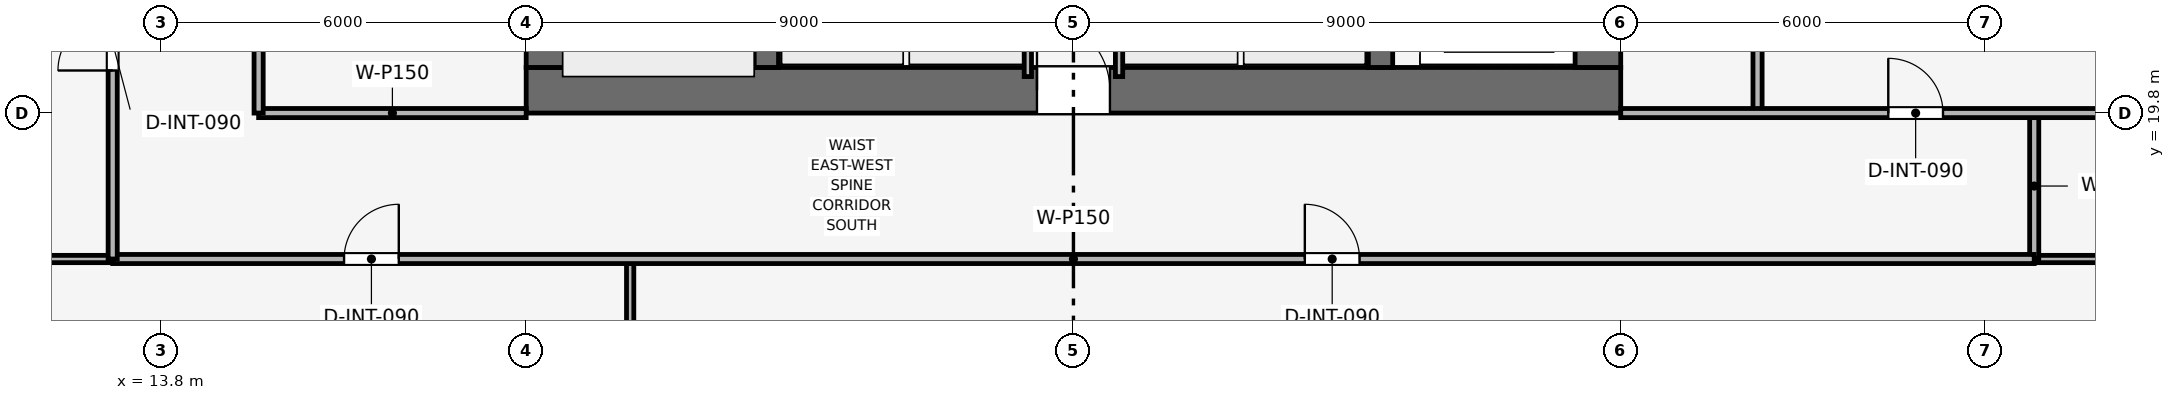
"""IFC4 building model, lengths in metres.
Left out: names, types, materials, properties, quantities, classifications, styles, units other than length and angle.
Written with IfcOpenShell. Run it as: python <this file> out.ifc"""

import sys

from ifc_helpers import new_model, si_unit, direction, frame, frame_2d, origin, place, context, subcontext, project, spatial, rectangle, extrude, element, fill, save


model = new_model("IFC4")
c1 = context("Model", 3, precision=1e-05, world=origin(), true_north=direction((0.0, 1.0)))
c2 = subcontext(c1, "Body", "Model", "MODEL_VIEW")
j1 = project(units=[si_unit("LENGTHUNIT", "METRE"), si_unit("PLANEANGLEUNIT", "RADIAN")], contexts=[c1])
p1 = place(None, origin())
s1 = spatial("IfcSite", under=j1, at=p1, CompositionType="ELEMENT")
p2 = place(p1, origin())
s2 = spatial("IfcBuilding", under=s1, at=p2, CompositionType="ELEMENT")
p3 = place(p2, frame((0.0, 0.0, 229.95)))
s3 = spatial("IfcBuildingStorey", under=s2, at=p3, CompositionType="ELEMENT", Elevation=229.95)
p4 = place(p3, frame((19.8, 20.175, 0.0), z_axis=(0.0, 0.0, 1.0), x_axis=(1.0, 0.0, 0.0)))
e1 = element("IfcWall", 1, at=p4, inside=s3, PredefinedType="SHEAR", context=c2, shape_type="SweptSolid", body=[
    extrude(rectangle(XDim=18.0, YDim=0.75, at=frame_2d((9.0, 0.0))), origin(), (0.0, 0.0, 1.0), 3.75),
])
p5 = place(p4, frame((8.4, 0.0, 0.0)))
e2 = element("IfcOpeningElement", 2, at=p5, cuts=e1, PredefinedType="OPENING", context=c2, shape_type="SweptSolid", body=[
    extrude(rectangle(XDim=1.2, YDim=2.2, at=frame_2d((0.6, 1.1))), frame((0.0, 0.385, 0.0), z_axis=(0.0, -1.0, 0.0), x_axis=(1.0, 0.0, 0.0)), (0.0, 0.0, 1.0), 0.77),
])
p6 = place(p3, frame((20.175, 20.55, 0.0), z_axis=(0.0, 0.0, 1.0), x_axis=(0.0, 1.0, 0.0)))
e3 = element("IfcWall", 3, at=p6, inside=s3, PredefinedType="SHEAR", context=c2, shape_type="SweptSolid", body=[
    extrude(rectangle(XDim=16.5, YDim=0.75, at=frame_2d((8.25, 0.0))), origin(), (0.0, 0.0, 1.0), 3.75),
])
p7 = place(p6, frame((10.25, 0.0, 0.0)))
e4 = element("IfcOpeningElement", 4, at=p7, cuts=e3, PredefinedType="OPENING", context=c2, shape_type="SweptSolid", body=[
    extrude(rectangle(XDim=1.1, YDim=2.15, at=frame_2d((0.55, 1.075))), frame((0.0, 0.385, 0.0), z_axis=(0.0, -1.0, 0.0), x_axis=(1.0, 0.0, 0.0)), (0.0, 0.0, 1.0), 0.77),
])
p8 = place(p3, frame((37.425, 20.55, 0.0), z_axis=(0.0, 0.0, 1.0), x_axis=(0.0, 1.0, 0.0)))
e5 = element("IfcWall", 5, at=p8, inside=s3, PredefinedType="SHEAR", context=c2, shape_type="SweptSolid", body=[
    extrude(rectangle(XDim=16.5, YDim=0.75, at=frame_2d((8.25, 0.0))), origin(), (0.0, 0.0, 1.0), 3.75),
])
p9 = place(p8, frame((4.75, 0.0, 0.0)))
e6 = element("IfcOpeningElement", 6, at=p9, cuts=e5, PredefinedType="OPENING", context=c2, shape_type="SweptSolid", body=[
    extrude(rectangle(XDim=1.1, YDim=2.15, at=frame_2d((0.55, 1.075))), frame((0.0, 0.385, 0.0), z_axis=(0.0, -1.0, 0.0), x_axis=(1.0, 0.0, 0.0)), (0.0, 0.0, 1.0), 0.77),
])
for number, where, z_axis, x_axis in (
    (7, (23.75, 20.55, 0.0), (0.0, 0.0, 1.0), (0.0, 1.0, 0.0)),
    (8, (33.85, 20.55, 0.0), (0.0, 0.0, 1.0), (0.0, 1.0, 0.0)),
):
    element("IfcWall", number, at=place(p3, frame(where, z_axis=z_axis, x_axis=x_axis)), inside=s3, PredefinedType="SHEAR", context=c2, shape_type="SweptSolid", body=[
        extrude(rectangle(XDim=16.5, YDim=0.4, at=frame_2d((8.25, 0.0))), origin(), (0.0, 0.0, 1.0), 3.75),
    ])
for number, where, z_axis, x_axis in (
    (9, (28.05, 20.4, 0.0), (0.0, 0.0, 1.0), (0.0, 1.0, 0.0)),
    (10, (29.55, 20.4, 0.0), (0.0, 0.0, 1.0), (0.0, 1.0, 0.0)),
):
    element("IfcWall", number, at=place(p3, frame(where, z_axis=z_axis, x_axis=x_axis)), inside=s3, PredefinedType="PARTITIONING", context=c2, shape_type="SweptSolid", body=[
        extrude(rectangle(XDim=2.75, YDim=0.12, at=frame_2d((1.375, 0.0))), origin(), (0.0, 0.0, 1.0), 3.5),
    ])
p10 = place(p3, frame((15.4, 19.8, 0.0), z_axis=(0.0, 0.0, 1.0), x_axis=(1.0, 0.0, 0.0)))
e11 = element("IfcWall", 11, at=p10, inside=s3, PredefinedType="PARTITIONING", context=c2, shape_type="SweptSolid", body=[
    extrude(rectangle(XDim=4.4, YDim=0.15, at=frame_2d((2.2, 0.0))), origin(), (0.0, 0.0, 1.0), 3.035),
])
p11 = place(p3, frame((15.4, 19.8, 0.0), z_axis=(0.0, 0.0, 1.0), x_axis=(0.0, 1.0, 0.0)))
e12 = element("IfcWall", 12, at=p11, inside=s3, PredefinedType="PARTITIONING", context=c2, shape_type="SweptSolid", body=[
    extrude(rectangle(XDim=10.35, YDim=0.15, at=frame_2d((5.175, 0.0))), origin(), (0.0, 0.0, 1.0), 3.035),
])
p12 = place(p11, frame((1.2, 0.0, 0.0)))
e13 = element("IfcOpeningElement", 13, at=p12, cuts=e12, PredefinedType="OPENING", context=c2, shape_type="SweptSolid", body=[
    extrude(rectangle(XDim=0.9, YDim=2.1, at=frame_2d((0.45, 1.05))), frame((0.0, 0.085, 0.0), z_axis=(0.0, -1.0, 0.0), x_axis=(1.0, 0.0, 0.0)), (0.0, 0.0, 1.0), 0.17),
])
p13 = place(p11, frame((4.7, 0.0, 0.0)))
e14 = element("IfcOpeningElement", 14, at=p13, cuts=e12, PredefinedType="OPENING", context=c2, shape_type="SweptSolid", body=[
    extrude(rectangle(XDim=0.9, YDim=2.1, at=frame_2d((0.45, 1.05))), frame((0.0, 0.085, 0.0), z_axis=(0.0, -1.0, 0.0), x_axis=(1.0, 0.0, 0.0)), (0.0, 0.0, 1.0), 0.17),
])
p14 = place(p11, frame((8.1, 0.0, 0.0)))
e15 = element("IfcOpeningElement", 15, at=p14, cuts=e12, PredefinedType="OPENING", context=c2, shape_type="SweptSolid", body=[
    extrude(rectangle(XDim=0.95, YDim=2.1, at=frame_2d((0.475, 1.05))), frame((0.0, 0.085, 0.0), z_axis=(0.0, -1.0, 0.0), x_axis=(1.0, 0.0, 0.0)), (0.0, 0.0, 1.0), 0.17),
])
p15 = place(p3, frame((40.05, 19.8, 0.0), z_axis=(0.0, 0.0, 1.0), x_axis=(0.0, 1.0, 0.0)))
e16 = element("IfcWall", 16, at=p15, inside=s3, PredefinedType="PARTITIONING", context=c2, shape_type="SweptSolid", body=[
    extrude(rectangle(XDim=7.05, YDim=0.15, at=frame_2d((3.525, 0.0))), origin(), (0.0, 0.0, 1.0), 3.035),
])
p16 = place(p3, frame((21.51, 1.93, 0.0), z_axis=(0.0, 0.0, 1.0), x_axis=(0.0, 1.0, 0.0)))
e17 = element("IfcWall", 17, at=p16, inside=s3, PredefinedType="PARTITIONING", context=c2, shape_type="SweptSolid", body=[
    extrude(rectangle(XDim=15.47, YDim=0.12, at=frame_2d((7.735, 0.0))), origin(), (0.0, 0.0, 1.0), 2.885),
])
p17 = place(p3, frame((1.93, 17.4, 0.0), z_axis=(0.0, 0.0, 1.0), x_axis=(1.0, 0.0, 0.0)))
e18 = element("IfcWall", 18, at=p17, inside=s3, PredefinedType="PARTITIONING", context=c2, shape_type="SweptSolid", body=[
    extrude(rectangle(XDim=11.07, YDim=0.12, at=frame_2d((5.535, 0.0))), origin(), (0.0, 0.0, 1.0), 2.885),
])
p18 = place(p3, frame((44.6, 17.4, 0.0), z_axis=(0.0, 0.0, 1.0), x_axis=(1.0, 0.0, 0.0)))
e19 = element("IfcWall", 19, at=p18, inside=s3, PredefinedType="PARTITIONING", context=c2, shape_type="SweptSolid", body=[
    extrude(rectangle(XDim=11.07, YDim=0.12, at=frame_2d((5.535, 0.0))), origin(), (0.0, 0.0, 1.0), 2.885),
])
p19 = place(p3, frame((44.6, 17.4, 0.0), z_axis=(0.0, 0.0, 1.0), x_axis=(0.0, 1.0, 0.0)))
e20 = element("IfcWall", 20, at=p19, inside=s3, PredefinedType="PARTITIONING", context=c2, shape_type="SweptSolid", body=[
    extrude(rectangle(XDim=2.4, YDim=0.15, at=frame_2d((1.2, 0.0))), origin(), (0.0, 0.0, 1.0), 3.5),
])
p20 = place(p3, frame((37.8, 19.8, 0.0), z_axis=(0.0, 0.0, 1.0), x_axis=(1.0, 0.0, 0.0)))
e21 = element("IfcWall", 21, at=p20, inside=s3, PredefinedType="PARTITIONING", context=c2, shape_type="SweptSolid", body=[
    extrude(rectangle(XDim=17.87, YDim=0.15, at=frame_2d((8.935, 0.0))), origin(), (0.0, 0.0, 1.0), 2.885),
])
p21 = place(p20, frame((4.4, 0.0, 0.0)))
e22 = element("IfcOpeningElement", 22, at=p21, cuts=e21, PredefinedType="OPENING", context=c2, shape_type="SweptSolid", body=[
    extrude(rectangle(XDim=0.9, YDim=2.1, at=frame_2d((0.45, 1.05))), frame((0.0, 0.085, 0.0), z_axis=(0.0, -1.0, 0.0), x_axis=(1.0, 0.0, 0.0)), (0.0, 0.0, 1.0), 0.17),
])
p22 = place(p3, frame((13.0, 17.4, 0.0), z_axis=(0.0, 0.0, 1.0), x_axis=(1.0, 0.0, 0.0)))
e23 = element("IfcWall", 23, at=p22, inside=s3, PredefinedType="PARTITIONING", context=c2, shape_type="SweptSolid", body=[
    extrude(rectangle(XDim=31.6, YDim=0.15, at=frame_2d((15.8, 0.0))), origin(), (0.0, 0.0, 1.0), 3.035),
])
p23 = place(p22, frame((3.805, 0.0, 0.0)))
e24 = element("IfcOpeningElement", 24, at=p23, cuts=e23, PredefinedType="OPENING", context=c2, shape_type="SweptSolid", body=[
    extrude(rectangle(XDim=0.9, YDim=2.1, at=frame_2d((0.45, 1.05))), frame((0.0, 0.085, 0.0), z_axis=(0.0, -1.0, 0.0), x_axis=(1.0, 0.0, 0.0)), (0.0, 0.0, 1.0), 0.17),
])
p24 = place(p22, frame((19.605, 0.0, 0.0)))
e25 = element("IfcOpeningElement", 25, at=p24, cuts=e23, PredefinedType="OPENING", context=c2, shape_type="SweptSolid", body=[
    extrude(rectangle(XDim=0.9, YDim=2.1, at=frame_2d((0.45, 1.05))), frame((0.0, 0.085, 0.0), z_axis=(0.0, -1.0, 0.0), x_axis=(1.0, 0.0, 0.0)), (0.0, 0.0, 1.0), 0.17),
])
p25 = place(p3, frame((13.0, 17.4, 0.0), z_axis=(0.0, 0.0, 1.0), x_axis=(0.0, 1.0, 0.0)))
e26 = element("IfcWall", 26, at=p25, inside=s3, PredefinedType="PARTITIONING", context=c2, shape_type="SweptSolid", body=[
    extrude(rectangle(XDim=22.8, YDim=0.15, at=frame_2d((11.4, 0.0))), origin(), (0.0, 0.0, 1.0), 3.035),
])
p26 = place(p25, frame((3.1, 0.0, 0.0)))
e27 = element("IfcOpeningElement", 27, at=p26, cuts=e26, PredefinedType="OPENING", context=c2, shape_type="SweptSolid", body=[
    extrude(rectangle(XDim=0.9, YDim=2.1, at=frame_2d((0.45, 1.05))), frame((0.0, 0.085, 0.0), z_axis=(0.0, -1.0, 0.0), x_axis=(1.0, 0.0, 0.0)), (0.0, 0.0, 1.0), 0.17),
])
p27 = place(p25, frame((6.529, 0.0, 0.0)))
e28 = element("IfcOpeningElement", 28, at=p27, cuts=e26, PredefinedType="OPENING", context=c2, shape_type="SweptSolid", body=[
    extrude(rectangle(XDim=0.9, YDim=2.1, at=frame_2d((0.45, 1.05))), frame((0.0, 0.085, 0.0), z_axis=(0.0, -1.0, 0.0), x_axis=(1.0, 0.0, 0.0)), (0.0, 0.0, 1.0), 0.17),
])
p28 = place(p25, frame((10.957, 0.0, 0.0)))
e29 = element("IfcOpeningElement", 29, at=p28, cuts=e26, PredefinedType="OPENING", context=c2, shape_type="SweptSolid", body=[
    extrude(rectangle(XDim=0.9, YDim=2.1, at=frame_2d((0.45, 1.05))), frame((0.0, 0.085, 0.0), z_axis=(0.0, -1.0, 0.0), x_axis=(1.0, 0.0, 0.0)), (0.0, 0.0, 1.0), 0.17),
])
p29 = place(p25, frame((16.527, 0.0, 0.0)))
e30 = element("IfcOpeningElement", 30, at=p29, cuts=e26, PredefinedType="OPENING", context=c2, shape_type="SweptSolid", body=[
    extrude(rectangle(XDim=0.9, YDim=2.1, at=frame_2d((0.45, 1.05))), frame((0.0, 0.085, 0.0), z_axis=(0.0, -1.0, 0.0), x_axis=(1.0, 0.0, 0.0)), (0.0, 0.0, 1.0), 0.17),
])
p30 = place(p21, origin())
e31 = element("IfcDoor", 31, at=p30, inside=s3, OperationType="SINGLE_SWING_LEFT", PredefinedType="DOOR", context=c2, shape_type="SweptSolid", body=[
    extrude(rectangle(XDim=0.9, YDim=2.1, at=frame_2d((0.45, 1.05))), frame((0.0, 0.025, 0.0), z_axis=(0.0, -1.0, 0.0), x_axis=(1.0, 0.0, 0.0)), (0.0, 0.0, 1.0), 0.05),
])
fill(e22, e31)
p31 = place(p23, origin())
e32 = element("IfcDoor", 32, at=p31, inside=s3, OperationType="SINGLE_SWING_RIGHT", PredefinedType="DOOR", context=c2, shape_type="SweptSolid", body=[
    extrude(rectangle(XDim=0.9, YDim=2.1, at=frame_2d((0.45, 1.05))), frame((0.0, 0.025, 0.0), z_axis=(0.0, -1.0, 0.0), x_axis=(1.0, 0.0, 0.0)), (0.0, 0.0, 1.0), 0.05),
])
fill(e24, e32)
p32 = place(p24, origin())
e33 = element("IfcDoor", 33, at=p32, inside=s3, OperationType="SINGLE_SWING_LEFT", PredefinedType="DOOR", context=c2, shape_type="SweptSolid", body=[
    extrude(rectangle(XDim=0.9, YDim=2.1, at=frame_2d((0.45, 1.05))), frame((0.0, 0.025, 0.0), z_axis=(0.0, -1.0, 0.0), x_axis=(1.0, 0.0, 0.0)), (0.0, 0.0, 1.0), 0.05),
])
fill(e25, e33)
p33 = place(p26, origin())
e34 = element("IfcDoor", 34, at=p33, inside=s3, OperationType="SINGLE_SWING_LEFT", PredefinedType="DOOR", context=c2, shape_type="SweptSolid", body=[
    extrude(rectangle(XDim=0.9, YDim=2.1, at=frame_2d((0.45, 1.05))), frame((0.0, 0.025, 0.0), z_axis=(0.0, -1.0, 0.0), x_axis=(1.0, 0.0, 0.0)), (0.0, 0.0, 1.0), 0.05),
])
fill(e27, e34)
p34 = place(p5, origin())
e35 = element("IfcDoor", 35, at=p34, inside=s3, OperationType="SINGLE_SWING_LEFT", PredefinedType="DOOR", context=c2, shape_type="SweptSolid", body=[
    extrude(rectangle(XDim=1.2, YDim=2.2, at=frame_2d((0.6, 1.1))), frame((0.0, 0.025, 0.0), z_axis=(0.0, -1.0, 0.0), x_axis=(1.0, 0.0, 0.0)), (0.0, 0.0, 1.0), 0.05),
])
fill(e2, e35)
save(model, sys.argv[1])
